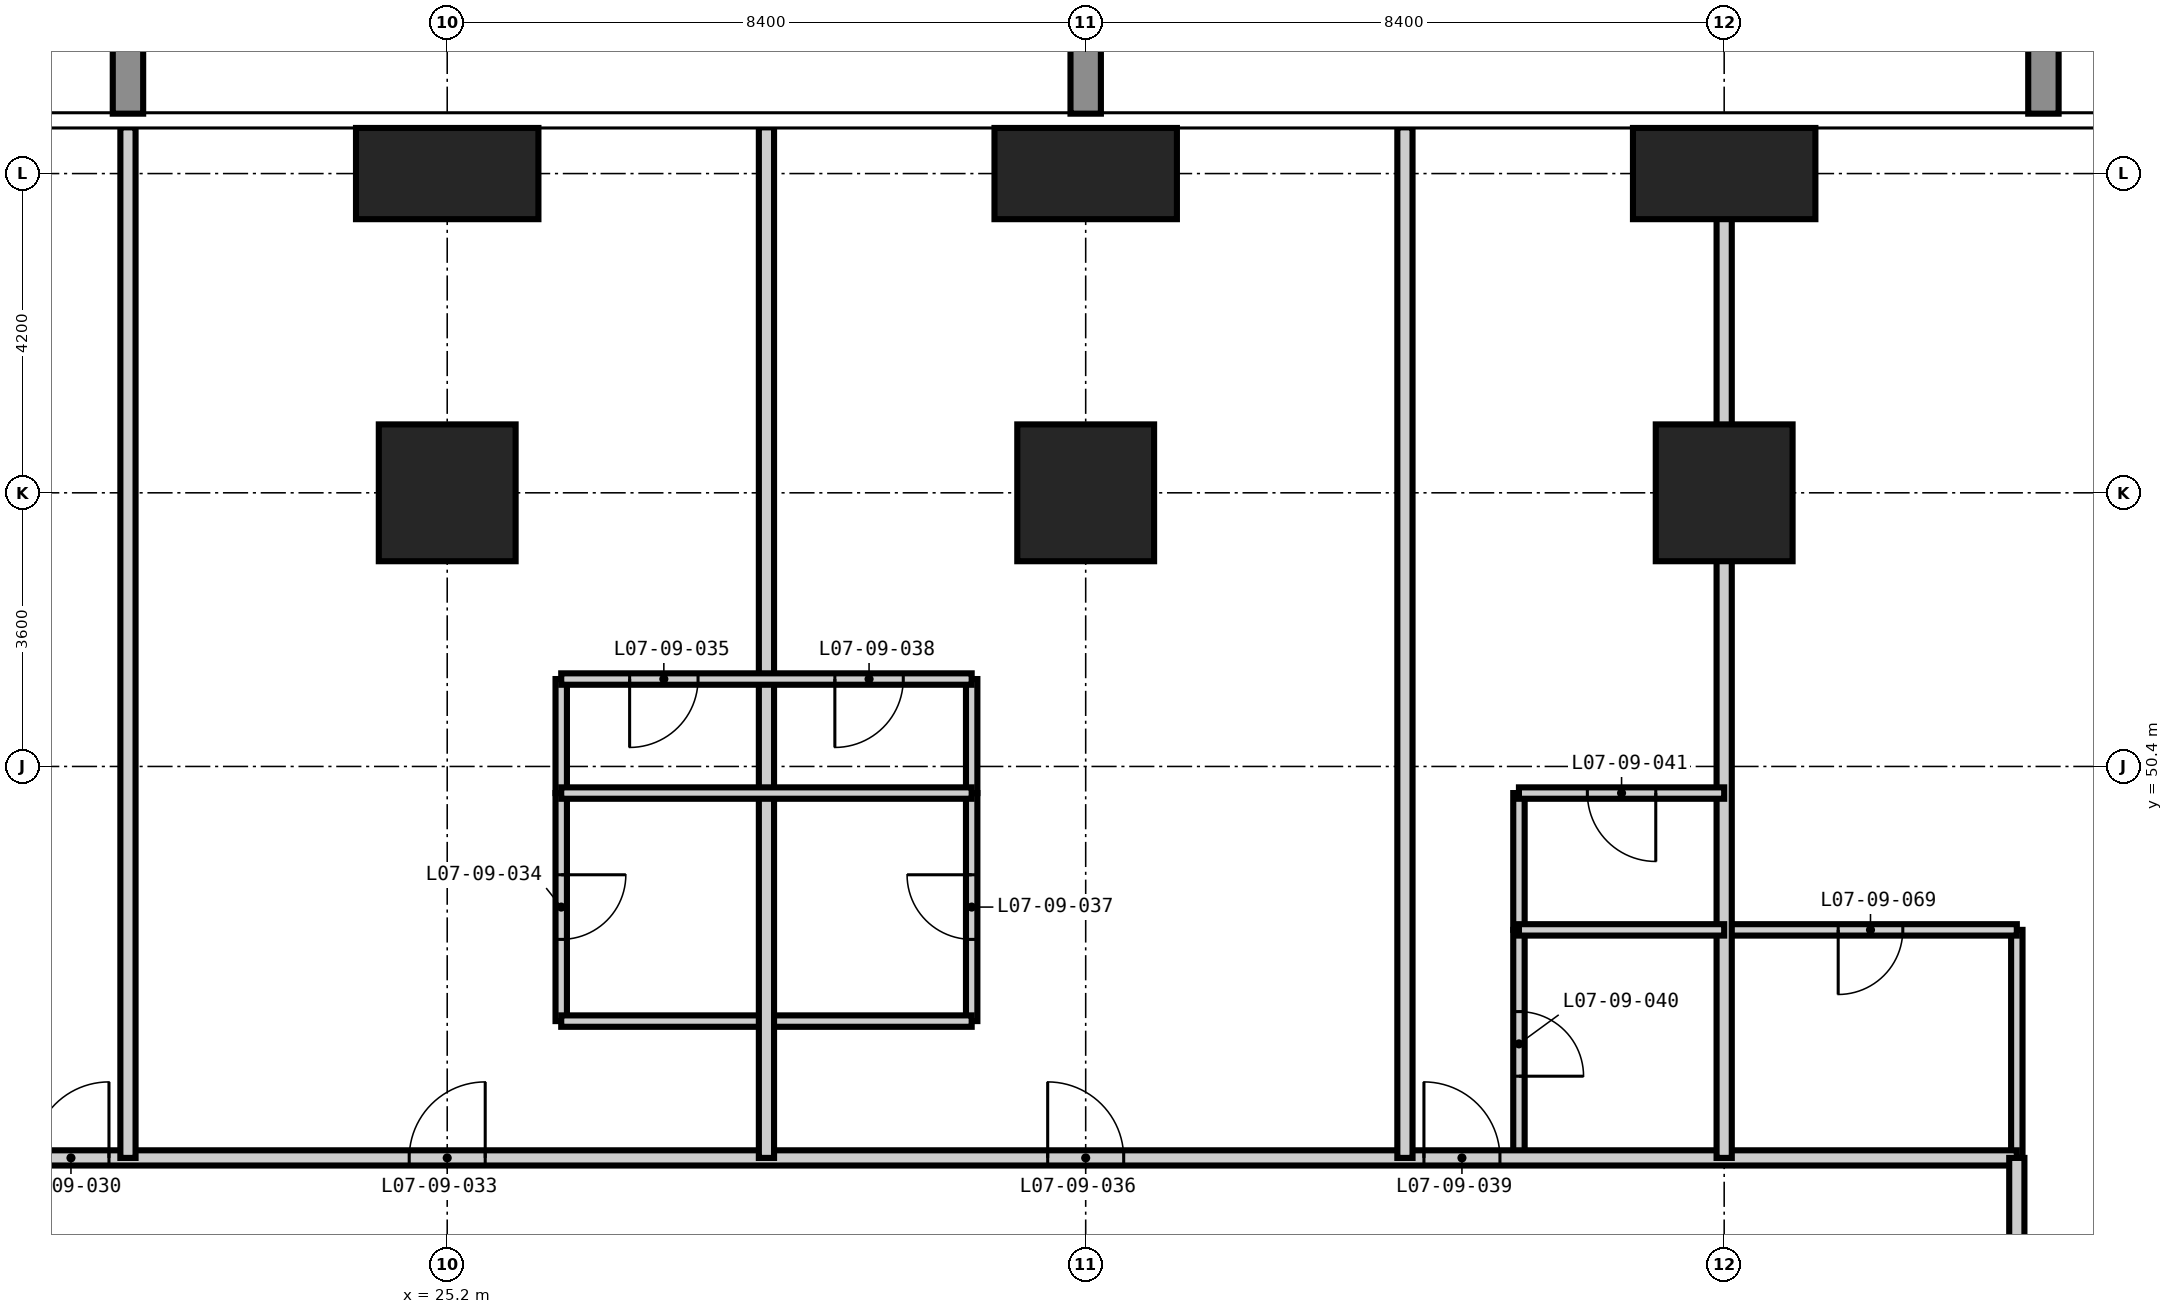
"""IFC4 building model, lengths in metres.
Left out: names, types, materials, properties, quantities, classifications, styles, units other than length and angle.
Written with IfcOpenShell. Run it as: python <this file> out.ifc"""

import sys

from ifc_helpers import new_model, si_unit, direction, frame, frame_2d, origin, origin_2d, place, context, subcontext, project, spatial, rectangle, extrude, element, fill, save


model = new_model("IFC4")
c1 = context("Model", 3, precision=1e-05, world=origin(), true_north=direction((0.0, 1.0)))
c2 = subcontext(c1, "Body", "Model", "MODEL_VIEW")
j1 = project(units=[si_unit("LENGTHUNIT", "METRE"), si_unit("PLANEANGLEUNIT", "RADIAN")], contexts=[c1])
p1 = place(None, origin())
s1 = spatial("IfcSite", under=j1, at=p1, CompositionType="ELEMENT")
p2 = place(p1, origin())
s2 = spatial("IfcBuilding", under=s1, at=p2, CompositionType="ELEMENT")
p3 = place(p2, frame((0.0, 0.0, 34.2)))
s3 = spatial("IfcBuildingStorey", under=s2, at=p3, CompositionType="ELEMENT", Elevation=34.2)
p4 = place(p3, frame((25.2, 54.0, -0.35), z_axis=(0.0, 0.0, 1.0), x_axis=(1.0, 0.0, 0.0)))
e1 = element("IfcColumn", 1, at=p4, inside=s3, PredefinedType="COLUMN", context=c2, shape_type="SweptSolid", body=[
    extrude(rectangle(XDim=1.8, YDim=1.8, at=origin_2d()), origin(), (0.0, 0.0, 1.0), 3.6),
])
p5 = place(p3, frame((25.2, 58.2, -0.35), z_axis=(0.0, 0.0, 1.0), x_axis=(1.0, 0.0, 0.0)))
e2 = element("IfcColumn", 2, at=p5, inside=s3, PredefinedType="COLUMN", context=c2, shape_type="SweptSolid", body=[
    extrude(rectangle(XDim=2.4, YDim=1.2, at=origin_2d()), origin(), (0.0, 0.0, 1.0), 3.6),
])
p6 = place(p3, frame((33.6, 54.0, -0.35), z_axis=(0.0, 0.0, 1.0), x_axis=(1.0, 0.0, 0.0)))
e3 = element("IfcColumn", 3, at=p6, inside=s3, PredefinedType="COLUMN", context=c2, shape_type="SweptSolid", body=[
    extrude(rectangle(XDim=1.8, YDim=1.8, at=origin_2d()), origin(), (0.0, 0.0, 1.0), 3.6),
])
p7 = place(p3, frame((33.6, 58.2, -0.35), z_axis=(0.0, 0.0, 1.0), x_axis=(1.0, 0.0, 0.0)))
e4 = element("IfcColumn", 4, at=p7, inside=s3, PredefinedType="COLUMN", context=c2, shape_type="SweptSolid", body=[
    extrude(rectangle(XDim=2.4, YDim=1.2, at=origin_2d()), origin(), (0.0, 0.0, 1.0), 3.6),
])
p8 = place(p3, frame((42.0, 54.0, -0.35), z_axis=(0.0, 0.0, 1.0), x_axis=(1.0, 0.0, 0.0)))
e5 = element("IfcColumn", 5, at=p8, inside=s3, PredefinedType="COLUMN", context=c2, shape_type="SweptSolid", body=[
    extrude(rectangle(XDim=1.8, YDim=1.8, at=origin_2d()), origin(), (0.0, 0.0, 1.0), 3.6),
])
p9 = place(p3, frame((42.0, 58.2, -0.35), z_axis=(0.0, 0.0, 1.0), x_axis=(1.0, 0.0, 0.0)))
e6 = element("IfcColumn", 6, at=p9, inside=s3, PredefinedType="COLUMN", context=c2, shape_type="SweptSolid", body=[
    extrude(rectangle(XDim=2.4, YDim=1.2, at=origin_2d()), origin(), (0.0, 0.0, 1.0), 3.6),
])
p10 = place(p3, frame((26.7, 47.05, 0.0), z_axis=(0.0, 0.0, 1.0), x_axis=(0.0, 1.0, 0.0)))
e7 = element("IfcWall", 7, at=p10, inside=s3, PredefinedType="PARTITIONING", context=c2, shape_type="SweptSolid", body=[
    extrude(rectangle(XDim=3.0, YDim=0.15, at=frame_2d((1.5, 0.0))), origin(), (0.0, 0.0, 1.0), 3.25),
])
p11 = place(p10, frame((1.075, 0.0, 0.0)))
e8 = element("IfcOpeningElement", 8, at=p11, cuts=e7, PredefinedType="OPENING", context=c2, shape_type="SweptSolid", body=[
    extrude(rectangle(XDim=0.85, YDim=2.1, at=frame_2d((0.425, 1.05))), frame((0.0, 0.085, 0.0), z_axis=(0.0, -1.0, 0.0), x_axis=(1.0, 0.0, 0.0)), (0.0, 0.0, 1.0), 0.17),
])
p12 = place(p3, frame((32.1, 47.05, 0.0), z_axis=(0.0, 0.0, 1.0), x_axis=(0.0, 1.0, 0.0)))
e9 = element("IfcWall", 9, at=p12, inside=s3, PredefinedType="PARTITIONING", context=c2, shape_type="SweptSolid", body=[
    extrude(rectangle(XDim=3.0, YDim=0.15, at=frame_2d((1.5, 0.0))), origin(), (0.0, 0.0, 1.0), 3.25),
])
p13 = place(p12, frame((1.075, 0.0, 0.0)))
e10 = element("IfcOpeningElement", 10, at=p13, cuts=e9, PredefinedType="OPENING", context=c2, shape_type="SweptSolid", body=[
    extrude(rectangle(XDim=0.85, YDim=2.1, at=frame_2d((0.425, 1.05))), frame((0.0, 0.085, 0.0), z_axis=(0.0, -1.0, 0.0), x_axis=(1.0, 0.0, 0.0)), (0.0, 0.0, 1.0), 0.17),
])
p14 = place(p3, frame((39.3, 45.25, 0.0), z_axis=(0.0, 0.0, 1.0), x_axis=(0.0, 1.0, 0.0)))
e11 = element("IfcWall", 11, at=p14, inside=s3, PredefinedType="PARTITIONING", context=c2, shape_type="SweptSolid", body=[
    extrude(rectangle(XDim=3.0, YDim=0.15, at=frame_2d((1.5, 0.0))), origin(), (0.0, 0.0, 1.0), 3.25),
])
p15 = place(p14, frame((1.075, 0.0, 0.0)))
e12 = element("IfcOpeningElement", 12, at=p15, cuts=e11, PredefinedType="OPENING", context=c2, shape_type="SweptSolid", body=[
    extrude(rectangle(XDim=0.85, YDim=2.1, at=frame_2d((0.425, 1.05))), frame((0.0, 0.085, 0.0), z_axis=(0.0, -1.0, 0.0), x_axis=(1.0, 0.0, 0.0)), (0.0, 0.0, 1.0), 0.17),
])
p16 = place(p3, frame((45.85, 45.25, 0.0), z_axis=(0.0, 0.0, 1.0), x_axis=(0.0, 1.0, 0.0)))
e13 = element("IfcWall", 13, at=p16, inside=s3, PredefinedType="PARTITIONING", context=c2, shape_type="SweptSolid", body=[
    extrude(rectangle(XDim=3.0, YDim=0.15, at=frame_2d((1.5, 0.0))), origin(), (0.0, 0.0, 1.0), 3.25),
])
p17 = place(p3, frame((26.7, 47.05, 0.0), z_axis=(0.0, 0.0, 1.0), x_axis=(1.0, 0.0, 0.0)))
e14 = element("IfcWall", 14, at=p17, inside=s3, PredefinedType="PARTITIONING", context=c2, shape_type="SweptSolid", body=[
    extrude(rectangle(XDim=5.4, YDim=0.15, at=frame_2d((2.7, 0.0))), origin(), (0.0, 0.0, 1.0), 3.25),
])
p18 = place(p3, frame((42.0, 48.25, 0.0), z_axis=(0.0, 0.0, 1.0), x_axis=(1.0, 0.0, 0.0)))
e15 = element("IfcWall", 15, at=p18, inside=s3, PredefinedType="PARTITIONING", context=c2, shape_type="SweptSolid", body=[
    extrude(rectangle(XDim=3.85, YDim=0.15, at=frame_2d((1.925, 0.0))), origin(), (0.0, 0.0, 1.0), 3.25),
])
p19 = place(p18, frame((1.5, 0.0, 0.0)))
e16 = element("IfcOpeningElement", 16, at=p19, cuts=e15, PredefinedType="OPENING", context=c2, shape_type="SweptSolid", body=[
    extrude(rectangle(XDim=0.85, YDim=2.1, at=frame_2d((0.425, 1.05))), frame((0.0, 0.085, 0.0), z_axis=(0.0, -1.0, 0.0), x_axis=(1.0, 0.0, 0.0)), (0.0, 0.0, 1.0), 0.17),
])
p20 = place(p3, frame((13.25, 45.25, 0.0), z_axis=(0.0, 0.0, 1.0), x_axis=(1.0, 0.0, 0.0)))
e17 = element("IfcWall", 17, at=p20, inside=s3, PredefinedType="PARTITIONING", context=c2, shape_type="SweptSolid", body=[
    extrude(rectangle(XDim=32.6, YDim=0.2, at=frame_2d((16.3, 0.0))), origin(), (0.0, 0.0, 1.0), 3.25),
])
p21 = place(p20, frame((6.5, 0.0, 0.0)))
e18 = element("IfcOpeningElement", 18, at=p21, cuts=e17, PredefinedType="OPENING", context=c2, shape_type="SweptSolid", body=[
    extrude(rectangle(XDim=1.0, YDim=2.2, at=frame_2d((0.5, 1.1))), frame((0.0, 0.11, 0.0), z_axis=(0.0, -1.0, 0.0), x_axis=(1.0, 0.0, 0.0)), (0.0, 0.0, 1.0), 0.22),
])
p22 = place(p20, frame((11.45, 0.0, 0.0)))
e19 = element("IfcOpeningElement", 19, at=p22, cuts=e17, PredefinedType="OPENING", context=c2, shape_type="SweptSolid", body=[
    extrude(rectangle(XDim=1.0, YDim=2.2, at=frame_2d((0.5, 1.1))), frame((0.0, 0.11, 0.0), z_axis=(0.0, -1.0, 0.0), x_axis=(1.0, 0.0, 0.0)), (0.0, 0.0, 1.0), 0.22),
])
p23 = place(p20, frame((19.85, 0.0, 0.0)))
e20 = element("IfcOpeningElement", 20, at=p23, cuts=e17, PredefinedType="OPENING", context=c2, shape_type="SweptSolid", body=[
    extrude(rectangle(XDim=1.0, YDim=2.2, at=frame_2d((0.5, 1.1))), frame((0.0, 0.11, 0.0), z_axis=(0.0, -1.0, 0.0), x_axis=(1.0, 0.0, 0.0)), (0.0, 0.0, 1.0), 0.22),
])
p24 = place(p20, frame((24.8, 0.0, 0.0)))
e21 = element("IfcOpeningElement", 21, at=p24, cuts=e17, PredefinedType="OPENING", context=c2, shape_type="SweptSolid", body=[
    extrude(rectangle(XDim=1.0, YDim=2.2, at=frame_2d((0.5, 1.1))), frame((0.0, 0.11, 0.0), z_axis=(0.0, -1.0, 0.0), x_axis=(1.0, 0.0, 0.0)), (0.0, 0.0, 1.0), 0.22),
])
p25 = place(p3, frame((45.85, 45.25, 0.0), z_axis=(0.0, 0.0, 1.0), x_axis=(0.0, -1.0, 0.0)))
e22 = element("IfcWall", 22, at=p25, inside=s3, PredefinedType="PARTITIONING", context=c2, shape_type="SweptSolid", body=[
    extrude(rectangle(XDim=32.0, YDim=0.2, at=frame_2d((16.0, 0.0))), origin(), (0.0, 0.0, 1.0), 3.25),
])
p26 = place(p25, frame((23.75, 0.0, 0.0)))
e23 = element("IfcOpeningElement", 23, at=p26, cuts=e22, PredefinedType="OPENING", context=c2, shape_type="SweptSolid", body=[
    extrude(rectangle(XDim=1.0, YDim=2.2, at=frame_2d((0.5, 1.1))), frame((0.0, 0.11, 0.0), z_axis=(0.0, -1.0, 0.0), x_axis=(1.0, 0.0, 0.0)), (0.0, 0.0, 1.0), 0.22),
])
p27 = place(p25, frame((15.35, 0.0, 0.0)))
e24 = element("IfcOpeningElement", 24, at=p27, cuts=e22, PredefinedType="OPENING", context=c2, shape_type="SweptSolid", body=[
    extrude(rectangle(XDim=1.0, YDim=2.2, at=frame_2d((0.5, 1.1))), frame((0.0, 0.11, 0.0), z_axis=(0.0, -1.0, 0.0), x_axis=(1.0, 0.0, 0.0)), (0.0, 0.0, 1.0), 0.22),
])
p28 = place(p25, frame((6.95, 0.0, 0.0)))
e25 = element("IfcOpeningElement", 25, at=p28, cuts=e22, PredefinedType="OPENING", context=c2, shape_type="SweptSolid", body=[
    extrude(rectangle(XDim=1.0, YDim=2.2, at=frame_2d((0.5, 1.1))), frame((0.0, 0.11, 0.0), z_axis=(0.0, -1.0, 0.0), x_axis=(1.0, 0.0, 0.0)), (0.0, 0.0, 1.0), 0.22),
])
p29 = place(p25, frame((29.725, 0.0, 0.0)))
e26 = element("IfcOpeningElement", 26, at=p29, cuts=e22, PredefinedType="OPENING", context=c2, shape_type="SweptSolid", body=[
    extrude(rectangle(XDim=1.0, YDim=2.2, at=frame_2d((0.5, 1.1))), frame((0.0, 0.11, 0.0), z_axis=(0.0, -1.0, 0.0), x_axis=(1.0, 0.0, 0.0)), (0.0, 0.0, 1.0), 0.22),
])
p30 = place(p25, frame((1.125, 0.0, 0.0)))
e27 = element("IfcOpeningElement", 27, at=p30, cuts=e22, PredefinedType="OPENING", context=c2, shape_type="SweptSolid", body=[
    extrude(rectangle(XDim=1.0, YDim=2.2, at=frame_2d((0.5, 1.1))), frame((0.0, 0.11, 0.0), z_axis=(0.0, -1.0, 0.0), x_axis=(1.0, 0.0, 0.0)), (0.0, 0.0, 1.0), 0.22),
])
for number, where, z_axis, x_axis in (
    (28, (21.0, 45.25, 0.0), (0.0, 0.0, 1.0), (0.0, 1.0, 0.0)),
    (29, (29.4, 45.25, 0.0), (0.0, 0.0, 1.0), (0.0, 1.0, 0.0)),
    (30, (37.8, 45.25, 0.0), (0.0, 0.0, 1.0), (0.0, 1.0, 0.0)),
    (31, (42.0, 45.25, 0.0), (0.0, 0.0, 1.0), (0.0, 1.0, 0.0)),
):
    element("IfcWall", number, at=place(p3, frame(where, z_axis=z_axis, x_axis=x_axis)), inside=s3, PredefinedType="PARTITIONING", context=c2, shape_type="SweptSolid", body=[
        extrude(rectangle(XDim=13.558, YDim=0.2, at=frame_2d((6.779, 0.0))), origin(), (0.0, 0.0, 1.0), 3.25),
    ])
for number, where, z_axis, x_axis in (
    (32, (26.7, 50.05, 0.0), (0.0, 0.0, 1.0), (0.0, 1.0, 0.0)),
    (33, (32.1, 50.05, 0.0), (0.0, 0.0, 1.0), (0.0, 1.0, 0.0)),
):
    element("IfcWall", number, at=place(p3, frame(where, z_axis=z_axis, x_axis=x_axis)), inside=s3, PredefinedType="PARTITIONING", context=c2, shape_type="SweptSolid", body=[
        extrude(rectangle(XDim=1.5, YDim=0.15, at=frame_2d((0.75, 0.0))), origin(), (0.0, 0.0, 1.0), 3.25),
    ])
p31 = place(p3, frame((39.3, 48.25, 0.0), z_axis=(0.0, 0.0, 1.0), x_axis=(0.0, 1.0, 0.0)))
e34 = element("IfcWall", 34, at=p31, inside=s3, PredefinedType="PARTITIONING", context=c2, shape_type="SweptSolid", body=[
    extrude(rectangle(XDim=1.8, YDim=0.15, at=frame_2d((0.9, 0.0))), origin(), (0.0, 0.0, 1.0), 3.25),
])
p32 = place(p3, frame((39.3, 48.25, 0.0), z_axis=(0.0, 0.0, 1.0), x_axis=(1.0, 0.0, 0.0)))
e35 = element("IfcWall", 35, at=p32, inside=s3, PredefinedType="PARTITIONING", context=c2, shape_type="SweptSolid", body=[
    extrude(rectangle(XDim=2.7, YDim=0.15, at=frame_2d((1.35, 0.0))), origin(), (0.0, 0.0, 1.0), 3.25),
])
p33 = place(p3, frame((26.7, 50.05, 0.0), z_axis=(0.0, 0.0, 1.0), x_axis=(1.0, 0.0, 0.0)))
e36 = element("IfcWall", 36, at=p33, inside=s3, PredefinedType="PARTITIONING", context=c2, shape_type="SweptSolid", body=[
    extrude(rectangle(XDim=5.4, YDim=0.15, at=frame_2d((2.7, 0.0))), origin(), (0.0, 0.0, 1.0), 3.25),
])
p34 = place(p3, frame((39.3, 50.05, 0.0), z_axis=(0.0, 0.0, 1.0), x_axis=(1.0, 0.0, 0.0)))
e37 = element("IfcWall", 37, at=p34, inside=s3, PredefinedType="PARTITIONING", context=c2, shape_type="SweptSolid", body=[
    extrude(rectangle(XDim=2.7, YDim=0.15, at=frame_2d((1.35, 0.0))), origin(), (0.0, 0.0, 1.0), 3.25),
])
p35 = place(p34, frame((0.9, 0.0, 0.0)))
e38 = element("IfcOpeningElement", 38, at=p35, cuts=e37, PredefinedType="OPENING", context=c2, shape_type="SweptSolid", body=[
    extrude(rectangle(XDim=0.9, YDim=2.1, at=frame_2d((0.45, 1.05))), frame((0.0, 0.085, 0.0), z_axis=(0.0, -1.0, 0.0), x_axis=(1.0, 0.0, 0.0)), (0.0, 0.0, 1.0), 0.17),
])
p36 = place(p3, frame((26.7, 51.55, 0.0), z_axis=(0.0, 0.0, 1.0), x_axis=(1.0, 0.0, 0.0)))
e39 = element("IfcWall", 39, at=p36, inside=s3, PredefinedType="PARTITIONING", context=c2, shape_type="SweptSolid", body=[
    extrude(rectangle(XDim=5.4, YDim=0.15, at=frame_2d((2.7, 0.0))), origin(), (0.0, 0.0, 1.0), 3.25),
])
p37 = place(p36, frame((0.9, 0.0, 0.0)))
e40 = element("IfcOpeningElement", 40, at=p37, cuts=e39, PredefinedType="OPENING", context=c2, shape_type="SweptSolid", body=[
    extrude(rectangle(XDim=0.9, YDim=2.1, at=frame_2d((0.45, 1.05))), frame((0.0, 0.085, 0.0), z_axis=(0.0, -1.0, 0.0), x_axis=(1.0, 0.0, 0.0)), (0.0, 0.0, 1.0), 0.17),
])
p38 = place(p36, frame((3.6, 0.0, 0.0)))
e41 = element("IfcOpeningElement", 41, at=p38, cuts=e39, PredefinedType="OPENING", context=c2, shape_type="SweptSolid", body=[
    extrude(rectangle(XDim=0.9, YDim=2.1, at=frame_2d((0.45, 1.05))), frame((0.0, 0.085, 0.0), z_axis=(0.0, -1.0, 0.0), x_axis=(1.0, 0.0, 0.0)), (0.0, 0.0, 1.0), 0.17),
])
p39 = place(p21, origin())
e42 = element("IfcDoor", 42, at=p39, inside=s3, OperationType="SINGLE_SWING_RIGHT", PredefinedType="DOOR", context=c2, shape_type="SweptSolid", body=[
    extrude(rectangle(XDim=1.0, YDim=2.2, at=frame_2d((0.5, 1.1))), frame((0.0, 0.025, 0.0), z_axis=(0.0, -1.0, 0.0), x_axis=(1.0, 0.0, 0.0)), (0.0, 0.0, 1.0), 0.05),
])
fill(e18, e42)
p40 = place(p22, origin())
e43 = element("IfcDoor", 43, at=p40, inside=s3, OperationType="SINGLE_SWING_RIGHT", PredefinedType="DOOR", context=c2, shape_type="SweptSolid", body=[
    extrude(rectangle(XDim=1.0, YDim=2.2, at=frame_2d((0.5, 1.1))), frame((0.0, 0.025, 0.0), z_axis=(0.0, -1.0, 0.0), x_axis=(1.0, 0.0, 0.0)), (0.0, 0.0, 1.0), 0.05),
])
fill(e19, e43)
p41 = place(p11, frame((0.85, 0.0, 0.0), z_axis=(0.0, 0.0, 1.0), x_axis=(-1.0, 0.0, 0.0)))
e44 = element("IfcDoor", 44, at=p41, inside=s3, OperationType="SINGLE_SWING_LEFT", PredefinedType="DOOR", context=c2, shape_type="SweptSolid", body=[
    extrude(rectangle(XDim=0.85, YDim=2.1, at=frame_2d((0.425, 1.05))), frame((0.0, 0.025, 0.0), z_axis=(0.0, -1.0, 0.0), x_axis=(1.0, 0.0, 0.0)), (0.0, 0.0, 1.0), 0.05),
])
fill(e8, e44)
p42 = place(p37, frame((0.9, 0.0, 0.0), z_axis=(0.0, 0.0, 1.0), x_axis=(-1.0, 0.0, 0.0)))
e45 = element("IfcDoor", 45, at=p42, inside=s3, OperationType="SINGLE_SWING_RIGHT", PredefinedType="DOOR", context=c2, shape_type="SweptSolid", body=[
    extrude(rectangle(XDim=0.9, YDim=2.1, at=frame_2d((0.45, 1.05))), frame((0.0, 0.025, 0.0), z_axis=(0.0, -1.0, 0.0), x_axis=(1.0, 0.0, 0.0)), (0.0, 0.0, 1.0), 0.05),
])
fill(e40, e45)
p43 = place(p23, origin())
e46 = element("IfcDoor", 46, at=p43, inside=s3, OperationType="SINGLE_SWING_LEFT", PredefinedType="DOOR", context=c2, shape_type="SweptSolid", body=[
    extrude(rectangle(XDim=1.0, YDim=2.2, at=frame_2d((0.5, 1.1))), frame((0.0, 0.025, 0.0), z_axis=(0.0, -1.0, 0.0), x_axis=(1.0, 0.0, 0.0)), (0.0, 0.0, 1.0), 0.05),
])
fill(e20, e46)
p44 = place(p13, origin())
e47 = element("IfcDoor", 47, at=p44, inside=s3, OperationType="SINGLE_SWING_RIGHT", PredefinedType="DOOR", context=c2, shape_type="SweptSolid", body=[
    extrude(rectangle(XDim=0.85, YDim=2.1, at=frame_2d((0.425, 1.05))), frame((0.0, 0.025, 0.0), z_axis=(0.0, -1.0, 0.0), x_axis=(1.0, 0.0, 0.0)), (0.0, 0.0, 1.0), 0.05),
])
fill(e10, e47)
p45 = place(p38, frame((0.9, 0.0, 0.0), z_axis=(0.0, 0.0, 1.0), x_axis=(-1.0, 0.0, 0.0)))
e48 = element("IfcDoor", 48, at=p45, inside=s3, OperationType="SINGLE_SWING_RIGHT", PredefinedType="DOOR", context=c2, shape_type="SweptSolid", body=[
    extrude(rectangle(XDim=0.9, YDim=2.1, at=frame_2d((0.45, 1.05))), frame((0.0, 0.025, 0.0), z_axis=(0.0, -1.0, 0.0), x_axis=(1.0, 0.0, 0.0)), (0.0, 0.0, 1.0), 0.05),
])
fill(e41, e48)
p46 = place(p24, origin())
e49 = element("IfcDoor", 49, at=p46, inside=s3, OperationType="SINGLE_SWING_LEFT", PredefinedType="DOOR", context=c2, shape_type="SweptSolid", body=[
    extrude(rectangle(XDim=1.0, YDim=2.2, at=frame_2d((0.5, 1.1))), frame((0.0, 0.025, 0.0), z_axis=(0.0, -1.0, 0.0), x_axis=(1.0, 0.0, 0.0)), (0.0, 0.0, 1.0), 0.05),
])
fill(e21, e49)
p47 = place(p15, frame((0.85, 0.0, 0.0), z_axis=(0.0, 0.0, 1.0), x_axis=(-1.0, 0.0, 0.0)))
e50 = element("IfcDoor", 50, at=p47, inside=s3, OperationType="SINGLE_SWING_RIGHT", PredefinedType="DOOR", context=c2, shape_type="SweptSolid", body=[
    extrude(rectangle(XDim=0.85, YDim=2.1, at=frame_2d((0.425, 1.05))), frame((0.0, 0.025, 0.0), z_axis=(0.0, -1.0, 0.0), x_axis=(1.0, 0.0, 0.0)), (0.0, 0.0, 1.0), 0.05),
])
fill(e12, e50)
p48 = place(p35, frame((0.9, 0.0, 0.0), z_axis=(0.0, 0.0, 1.0), x_axis=(-1.0, 0.0, 0.0)))
e51 = element("IfcDoor", 51, at=p48, inside=s3, OperationType="SINGLE_SWING_LEFT", PredefinedType="DOOR", context=c2, shape_type="SweptSolid", body=[
    extrude(rectangle(XDim=0.9, YDim=2.1, at=frame_2d((0.45, 1.05))), frame((0.0, 0.025, 0.0), z_axis=(0.0, -1.0, 0.0), x_axis=(1.0, 0.0, 0.0)), (0.0, 0.0, 1.0), 0.05),
])
fill(e38, e51)
p49 = place(p19, frame((0.85, 0.0, 0.0), z_axis=(0.0, 0.0, 1.0), x_axis=(-1.0, 0.0, 0.0)))
e52 = element("IfcDoor", 52, at=p49, inside=s3, OperationType="SINGLE_SWING_RIGHT", PredefinedType="DOOR", context=c2, shape_type="SweptSolid", body=[
    extrude(rectangle(XDim=0.85, YDim=2.1, at=frame_2d((0.425, 1.05))), frame((0.0, 0.025, 0.0), z_axis=(0.0, -1.0, 0.0), x_axis=(1.0, 0.0, 0.0)), (0.0, 0.0, 1.0), 0.05),
])
fill(e16, e52)
save(model, sys.argv[1])
